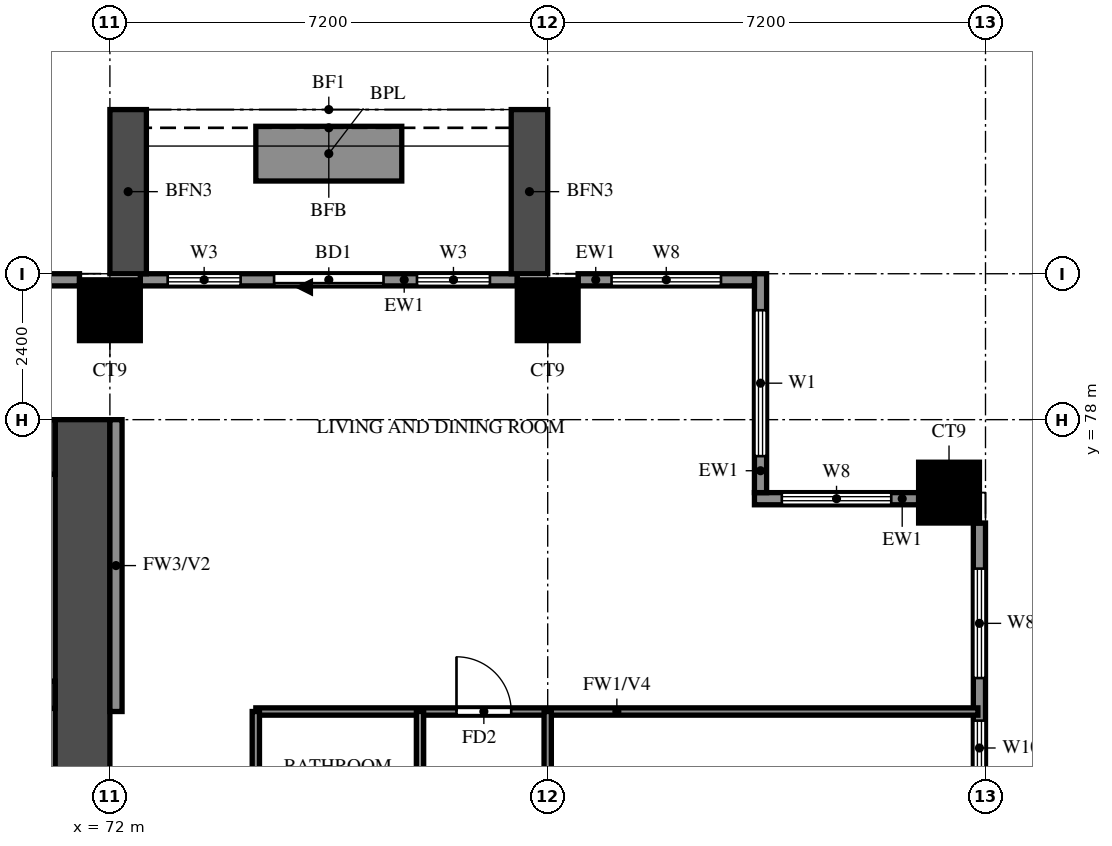
"""IFC4 building model, lengths in metres.
Left out: names, types, materials, properties, quantities, classifications, styles, units other than length and angle.
Written with IfcOpenShell. Run it as: python <this file> out.ifc"""

import sys

from ifc_helpers import new_model, si_unit, direction, frame, frame_2d, origin, origin_2d, place, context, subcontext, project, spatial, rectangle, extrude, source, transform, mapped, element, fill, save


model = new_model("IFC4")
c1 = context("Model", 3, precision=1e-05, world=origin(), true_north=direction((0.0, 1.0)))
c2 = subcontext(c1, "Body", "Model", "MODEL_VIEW")
j1 = project(units=[si_unit("LENGTHUNIT", "METRE"), si_unit("PLANEANGLEUNIT", "RADIAN")], contexts=[c1])
p1 = place(None, origin())
s1 = spatial("IfcSite", under=j1, at=p1, CompositionType="ELEMENT")
p2 = place(p1, origin())
s2 = spatial("IfcBuilding", under=s1, at=p2, CompositionType="ELEMENT")
p3 = place(p2, frame((0.0, 0.0, 72.5)))
s3 = spatial("IfcBuildingStorey", under=s2, at=p3, CompositionType="ELEMENT", Elevation=72.5)
m1 = source(origin(), c2, "Body", "SweptSolid", [
    extrude(rectangle(XDim=1.0, YDim=1.0, at=origin_2d()), origin(), (0.0, 0.0, 1.0), 3.18),
])
for number, where, z_axis, x_axis in (
    (1, (85.8, 76.8, 0.0), (0.0, 0.0, 1.0), (1.0, 0.0, 0.0)),
    (2, (72.0, 79.8, 0.0), (0.0, 0.0, 1.0), (1.0, 0.0, 0.0)),
    (3, (79.2, 79.8, 0.0), (0.0, 0.0, 1.0), (1.0, 0.0, 0.0)),
):
    element("IfcColumn", number, at=place(p3, frame(where, z_axis=z_axis, x_axis=x_axis)), inside=s3, PredefinedType="COLUMN", context=c2, shape_type="MappedRepresentation", body=[
        mapped(m1, transform((0.0, 0.0, 0.0))),
    ])
p4 = place(p3, frame((71.55, 66.0, 0.0), z_axis=(0.0, 0.0, 1.0), x_axis=(0.0, 1.0, 0.0)))
e4 = element("IfcWall", 4, at=p4, inside=s3, PredefinedType="SHEAR", context=c2, shape_type="SweptSolid", body=[
    extrude(rectangle(XDim=12.0, YDim=0.9, at=frame_2d((6.0, 0.0))), origin(), (0.0, 0.0, 1.0), 3.18),
])
p5 = place(p3, frame((29.7, 77.55, 0.0), z_axis=(0.0, 0.0, 1.0), x_axis=(1.0, 0.0, 0.0)))
e5 = element("IfcWall", 5, at=p5, inside=s3, PredefinedType="SHEAR", context=c2, shape_type="SweptSolid", body=[
    extrude(rectangle(XDim=41.4, YDim=0.9, at=frame_2d((20.7, 0.0))), origin(), (0.0, 0.0, 1.0), 3.18),
])
p6 = place(p3, frame((67.925, 73.475, 0.0), z_axis=(0.0, 0.0, 1.0), x_axis=(1.0, 0.0, 0.0)))
e6 = element("IfcWall", 6, at=p6, inside=s3, PredefinedType="SHEAR", context=c2, shape_type="SweptSolid", body=[
    extrude(rectangle(XDim=3.175, YDim=0.45, at=frame_2d((1.587, 0.0))), origin(), (0.0, 0.0, 1.0), 3.18),
])
p7 = place(p3, frame((86.3, 70.1, 0.0), z_axis=(0.0, 0.0, 1.0), x_axis=(0.0, 1.0, 0.0)))
e7 = element("IfcWall", 7, at=p7, inside=s3, PredefinedType="SOLIDWALL", context=c2, shape_type="SweptSolid", body=[
    extrude(rectangle(XDim=6.2, YDim=0.2, at=frame_2d((3.1, 0.0))), origin(), (0.0, 0.0, 1.0), 3.18),
])
p8 = place(p7, frame((2.05, 0.0, 0.6)))
e8 = element("IfcOpeningElement", 8, at=p8, cuts=e7, PredefinedType="OPENING", context=c2, shape_type="SweptSolid", body=[
    extrude(rectangle(XDim=0.9, YDim=2.4, at=frame_2d((0.45, 1.2))), frame((0.0, 0.11, 0.0), z_axis=(0.0, -1.0, 0.0), x_axis=(1.0, 0.0, 0.0)), (0.0, 0.0, 1.0), 0.22),
])
p9 = place(p7, frame((3.65, 0.0, 0.6)))
e9 = element("IfcOpeningElement", 9, at=p9, cuts=e7, PredefinedType="OPENING", context=c2, shape_type="SweptSolid", body=[
    extrude(rectangle(XDim=1.8, YDim=2.4, at=frame_2d((0.9, 1.2))), frame((0.0, 0.11, 0.0), z_axis=(0.0, -1.0, 0.0), x_axis=(1.0, 0.0, 0.0)), (0.0, 0.0, 1.0), 0.22),
])
p10 = place(p3, frame((85.3, 76.7, 0.0), z_axis=(0.0, 0.0, 1.0), x_axis=(-1.0, 0.0, 0.0)))
e10 = element("IfcWall", 10, at=p10, inside=s3, PredefinedType="SOLIDWALL", context=c2, shape_type="SweptSolid", body=[
    extrude(rectangle(XDim=2.7, YDim=0.2, at=frame_2d((1.35, 0.0))), origin(), (0.0, 0.0, 1.0), 3.18),
])
p11 = place(p10, frame((0.45, 0.0, 0.6)))
e11 = element("IfcOpeningElement", 11, at=p11, cuts=e10, PredefinedType="OPENING", context=c2, shape_type="SweptSolid", body=[
    extrude(rectangle(XDim=1.8, YDim=2.4, at=frame_2d((0.9, 1.2))), frame((0.0, 0.11, 0.0), z_axis=(0.0, -1.0, 0.0), x_axis=(1.0, 0.0, 0.0)), (0.0, 0.0, 1.0), 0.22),
])
p12 = place(p3, frame((82.7, 76.8, 0.0), z_axis=(0.0, 0.0, 1.0), x_axis=(0.0, 1.0, 0.0)))
e12 = element("IfcWall", 12, at=p12, inside=s3, PredefinedType="SOLIDWALL", context=c2, shape_type="SweptSolid", body=[
    extrude(rectangle(XDim=3.6, YDim=0.2, at=frame_2d((1.8, 0.0))), origin(), (0.0, 0.0, 1.0), 3.18),
])
p13 = place(p12, frame((0.6, 0.0, 0.6)))
e13 = element("IfcOpeningElement", 13, at=p13, cuts=e12, PredefinedType="OPENING", context=c2, shape_type="SweptSolid", body=[
    extrude(rectangle(XDim=2.4, YDim=2.4, at=frame_2d((1.2, 1.2))), frame((0.0, 0.11, 0.0), z_axis=(0.0, -1.0, 0.0), x_axis=(1.0, 0.0, 0.0)), (0.0, 0.0, 1.0), 0.22),
])
p14 = place(p3, frame((82.6, 80.3, 0.0), z_axis=(0.0, 0.0, 1.0), x_axis=(-1.0, 0.0, 0.0)))
e14 = element("IfcWall", 14, at=p14, inside=s3, PredefinedType="SOLIDWALL", context=c2, shape_type="SweptSolid", body=[
    extrude(rectangle(XDim=2.9, YDim=0.2, at=frame_2d((1.45, 0.0))), origin(), (0.0, 0.0, 1.0), 3.18),
])
p15 = place(p14, frame((0.55, 0.0, 0.6)))
e15 = element("IfcOpeningElement", 15, at=p15, cuts=e14, PredefinedType="OPENING", context=c2, shape_type="SweptSolid", body=[
    extrude(rectangle(XDim=1.8, YDim=2.4, at=frame_2d((0.9, 1.2))), frame((0.0, 0.11, 0.0), z_axis=(0.0, -1.0, 0.0), x_axis=(1.0, 0.0, 0.0)), (0.0, 0.0, 1.0), 0.22),
])
p16 = place(p3, frame((78.7, 80.3, 0.0), z_axis=(0.0, 0.0, 1.0), x_axis=(-1.0, 0.0, 0.0)))
e16 = element("IfcWall", 16, at=p16, inside=s3, PredefinedType="SOLIDWALL", context=c2, shape_type="SweptSolid", body=[
    extrude(rectangle(XDim=6.2, YDim=0.2, at=frame_2d((3.1, 0.0))), origin(), (0.0, 0.0, 1.0), 3.18),
])
p17 = place(p16, frame((2.2, 0.0, 0.0)))
e17 = element("IfcOpeningElement", 17, at=p17, cuts=e16, PredefinedType="OPENING", context=c2, shape_type="SweptSolid", body=[
    extrude(rectangle(XDim=1.8, YDim=2.4, at=frame_2d((0.9, 1.2))), frame((0.0, 0.11, 0.0), z_axis=(0.0, -1.0, 0.0), x_axis=(1.0, 0.0, 0.0)), (0.0, 0.0, 1.0), 0.22),
])
p18 = place(p16, frame((0.45, 0.0, 0.6)))
e18 = element("IfcOpeningElement", 18, at=p18, cuts=e16, PredefinedType="OPENING", context=c2, shape_type="SweptSolid", body=[
    extrude(rectangle(XDim=1.2, YDim=2.4, at=frame_2d((0.6, 1.2))), frame((0.0, 0.11, 0.0), z_axis=(0.0, -1.0, 0.0), x_axis=(1.0, 0.0, 0.0)), (0.0, 0.0, 1.0), 0.22),
])
p19 = place(p16, frame((4.55, 0.0, 0.6)))
e19 = element("IfcOpeningElement", 19, at=p19, cuts=e16, PredefinedType="OPENING", context=c2, shape_type="SweptSolid", body=[
    extrude(rectangle(XDim=1.2, YDim=2.4, at=frame_2d((0.6, 1.2))), frame((0.0, 0.11, 0.0), z_axis=(0.0, -1.0, 0.0), x_axis=(1.0, 0.0, 0.0)), (0.0, 0.0, 1.0), 0.22),
])
p20 = place(p3, frame((71.5, 80.3, 0.0), z_axis=(0.0, 0.0, 1.0), x_axis=(-1.0, 0.0, 0.0)))
e20 = element("IfcWall", 20, at=p20, inside=s3, PredefinedType="SOLIDWALL", context=c2, shape_type="SweptSolid", body=[
    extrude(rectangle(XDim=6.2, YDim=0.2, at=frame_2d((3.1, 0.0))), origin(), (0.0, 0.0, 1.0), 3.18),
])
for number, where, z_axis, x_axis in (
    (21, (78.9, 80.4, 0.0), (0.0, 0.0, 1.0), (0.0, 1.0, 0.0)),
    (22, (72.3, 80.4, 0.0), (0.0, 0.0, 1.0), (0.0, 1.0, 0.0)),
):
    element("IfcWall", number, at=place(p3, frame(where, z_axis=z_axis, x_axis=x_axis)), inside=s3, PredefinedType="SOLIDWALL", context=c2, shape_type="SweptSolid", body=[
        extrude(rectangle(XDim=2.7, YDim=0.6, at=frame_2d((1.35, 0.0))), origin(), (0.0, 0.0, 1.0), 2.85),
    ])
p21 = place(p3, frame((76.8, 82.375, 0.0), z_axis=(0.0, 0.0, 1.0), x_axis=(-1.0, 0.0, 0.0)))
e23 = element("IfcWall", 23, at=p21, inside=s3, PredefinedType="SOLIDWALL", context=c2, shape_type="SweptSolid", body=[
    extrude(rectangle(XDim=2.4, YDim=0.9, at=frame_2d((1.2, 0.0))), origin(), (0.0, 0.0, 1.0), 0.9),
])
p22 = place(p3, frame((72.1, 73.2, 0.0), z_axis=(0.0, 0.0, 1.0), x_axis=(0.0, 1.0, 0.0)))
e24 = element("IfcWall", 24, at=p22, inside=s3, PredefinedType="SOLIDWALL", context=c2, shape_type="SweptSolid", body=[
    extrude(rectangle(XDim=4.8, YDim=0.2, at=frame_2d((2.4, 0.0))), origin(), (0.0, 0.0, 1.0), 3.18),
])
p23 = place(p3, frame((74.4, 73.2, 0.0), z_axis=(0.0, 0.0, 1.0), x_axis=(1.0, 0.0, 0.0)))
e25 = element("IfcWall", 25, at=p23, inside=s3, PredefinedType="PARTITIONING", context=c2, shape_type="SweptSolid", body=[
    extrude(rectangle(XDim=11.875, YDim=0.12, at=frame_2d((5.938, 0.0))), origin(), (0.0, 0.0, 1.0), 2.28),
])
p24 = place(p23, frame((3.3, 0.0, 0.0)))
e26 = element("IfcOpeningElement", 26, at=p24, cuts=e25, PredefinedType="OPENING", context=c2, shape_type="SweptSolid", body=[
    extrude(rectangle(XDim=0.9, YDim=2.1, at=frame_2d((0.45, 1.05))), frame((0.0, 0.07, 0.0), z_axis=(0.0, -1.0, 0.0), x_axis=(1.0, 0.0, 0.0)), (0.0, 0.0, 1.0), 0.14),
])
p25 = place(p3, frame((74.4, 69.62, 0.0), z_axis=(0.0, 0.0, 1.0), x_axis=(0.0, 1.0, 0.0)))
e27 = element("IfcWall", 27, at=p25, inside=s3, PredefinedType="PARTITIONING", context=c2, shape_type="SweptSolid", body=[
    extrude(rectangle(XDim=3.58, YDim=0.12, at=frame_2d((1.79, 0.0))), origin(), (0.0, 0.0, 1.0), 3.18),
])
p26 = place(p3, frame((77.1, 64.8, 0.0), z_axis=(0.0, 0.0, 1.0), x_axis=(0.0, 1.0, 0.0)))
e28 = element("IfcWall", 28, at=p26, inside=s3, PredefinedType="PARTITIONING", context=c2, shape_type="SweptSolid", body=[
    extrude(rectangle(XDim=8.4, YDim=0.12, at=frame_2d((4.2, 0.0))), origin(), (0.0, 0.0, 1.0), 3.18),
])
p27 = place(p26, frame((1.875, 0.0, 0.0)))
e29 = element("IfcOpeningElement", 29, at=p27, cuts=e28, PredefinedType="OPENING", context=c2, shape_type="SweptSolid", body=[
    extrude(rectangle(XDim=0.9, YDim=2.1, at=frame_2d((0.45, 1.05))), frame((0.0, 0.07, 0.0), z_axis=(0.0, -1.0, 0.0), x_axis=(1.0, 0.0, 0.0)), (0.0, 0.0, 1.0), 0.14),
])
p28 = place(p26, frame((6.125, 0.0, 0.0)))
e30 = element("IfcOpeningElement", 30, at=p28, cuts=e28, PredefinedType="OPENING", context=c2, shape_type="SweptSolid", body=[
    extrude(rectangle(XDim=0.8, YDim=2.1, at=frame_2d((0.4, 1.05))), frame((0.0, 0.07, 0.0), z_axis=(0.0, -1.0, 0.0), x_axis=(1.0, 0.0, 0.0)), (0.0, 0.0, 1.0), 0.14),
])
p29 = place(p3, frame((79.2, 48.125, 0.0), z_axis=(0.0, 0.0, 1.0), x_axis=(0.0, 1.0, 0.0)))
e31 = element("IfcWall", 31, at=p29, inside=s3, PredefinedType="PARTITIONING", context=c2, shape_type="SweptSolid", body=[
    extrude(rectangle(XDim=25.075, YDim=0.12, at=frame_2d((12.538, 0.0))), origin(), (0.0, 0.0, 1.0), 3.18),
])
p30 = place(p29, frame((2.788, 0.0, 0.0)))
e32 = element("IfcOpeningElement", 32, at=p30, cuts=e31, PredefinedType="OPENING", context=c2, shape_type="SweptSolid", body=[
    extrude(rectangle(XDim=1.5, YDim=2.1, at=frame_2d((0.75, 1.05))), frame((0.0, 0.07, 0.0), z_axis=(0.0, -1.0, 0.0), x_axis=(1.0, 0.0, 0.0)), (0.0, 0.0, 1.0), 0.14),
])
p31 = place(p29, frame((8.425, 0.0, 0.0)))
e33 = element("IfcOpeningElement", 33, at=p31, cuts=e31, PredefinedType="OPENING", context=c2, shape_type="SweptSolid", body=[
    extrude(rectangle(XDim=0.9, YDim=2.1, at=frame_2d((0.45, 1.05))), frame((0.0, 0.07, 0.0), z_axis=(0.0, -1.0, 0.0), x_axis=(1.0, 0.0, 0.0)), (0.0, 0.0, 1.0), 0.14),
])
p32 = place(p29, frame((12.025, 0.0, 0.0)))
e34 = element("IfcOpeningElement", 34, at=p32, cuts=e31, PredefinedType="OPENING", context=c2, shape_type="SweptSolid", body=[
    extrude(rectangle(XDim=0.9, YDim=2.1, at=frame_2d((0.45, 1.05))), frame((0.0, 0.07, 0.0), z_axis=(0.0, -1.0, 0.0), x_axis=(1.0, 0.0, 0.0)), (0.0, 0.0, 1.0), 0.14),
])
p33 = place(p29, frame((15.625, 0.0, 0.0)))
e35 = element("IfcOpeningElement", 35, at=p33, cuts=e31, PredefinedType="OPENING", context=c2, shape_type="SweptSolid", body=[
    extrude(rectangle(XDim=0.9, YDim=2.1, at=frame_2d((0.45, 1.05))), frame((0.0, 0.07, 0.0), z_axis=(0.0, -1.0, 0.0), x_axis=(1.0, 0.0, 0.0)), (0.0, 0.0, 1.0), 0.14),
])
p34 = place(p29, frame((19.225, 0.0, 0.0)))
e36 = element("IfcOpeningElement", 36, at=p34, cuts=e31, PredefinedType="OPENING", context=c2, shape_type="SweptSolid", body=[
    extrude(rectangle(XDim=0.9, YDim=2.1, at=frame_2d((0.45, 1.05))), frame((0.0, 0.07, 0.0), z_axis=(0.0, -1.0, 0.0), x_axis=(1.0, 0.0, 0.0)), (0.0, 0.0, 1.0), 0.14),
])
p35 = place(p29, frame((22.825, 0.0, 0.0)))
e37 = element("IfcOpeningElement", 37, at=p35, cuts=e31, PredefinedType="OPENING", context=c2, shape_type="SweptSolid", body=[
    extrude(rectangle(XDim=0.9, YDim=2.1, at=frame_2d((0.45, 1.05))), frame((0.0, 0.07, 0.0), z_axis=(0.0, -1.0, 0.0), x_axis=(1.0, 0.0, 0.0)), (0.0, 0.0, 1.0), 0.14),
])
p36 = place(p8, origin())
e38 = element("IfcWindow", 38, at=p36, inside=s3, PartitioningType="SINGLE_PANEL", PredefinedType="WINDOW", context=c2, shape_type="SweptSolid", body=[
    extrude(rectangle(XDim=0.9, YDim=2.4, at=frame_2d((0.45, 1.2))), frame((0.0, 0.03, 0.0), z_axis=(0.0, -1.0, 0.0), x_axis=(1.0, 0.0, 0.0)), (0.0, 0.0, 1.0), 0.06),
])
fill(e8, e38)
p37 = place(p9, origin())
e39 = element("IfcWindow", 39, at=p37, inside=s3, PartitioningType="DOUBLE_PANEL_VERTICAL", PredefinedType="WINDOW", context=c2, shape_type="SweptSolid", body=[
    extrude(rectangle(XDim=1.8, YDim=2.4, at=frame_2d((0.9, 1.2))), frame((0.0, 0.03, 0.0), z_axis=(0.0, -1.0, 0.0), x_axis=(1.0, 0.0, 0.0)), (0.0, 0.0, 1.0), 0.06),
])
fill(e9, e39)
p38 = place(p11, origin())
e40 = element("IfcWindow", 40, at=p38, inside=s3, PartitioningType="DOUBLE_PANEL_VERTICAL", PredefinedType="WINDOW", context=c2, shape_type="SweptSolid", body=[
    extrude(rectangle(XDim=1.8, YDim=2.4, at=frame_2d((0.9, 1.2))), frame((0.0, 0.03, 0.0), z_axis=(0.0, -1.0, 0.0), x_axis=(1.0, 0.0, 0.0)), (0.0, 0.0, 1.0), 0.06),
])
fill(e11, e40)
p39 = place(p13, origin())
e41 = element("IfcWindow", 41, at=p39, inside=s3, PartitioningType="DOUBLE_PANEL_VERTICAL", PredefinedType="WINDOW", context=c2, shape_type="SweptSolid", body=[
    extrude(rectangle(XDim=2.4, YDim=2.4, at=frame_2d((1.2, 1.2))), frame((0.0, 0.03, 0.0), z_axis=(0.0, -1.0, 0.0), x_axis=(1.0, 0.0, 0.0)), (0.0, 0.0, 1.0), 0.06),
])
fill(e13, e41)
p40 = place(p15, origin())
e42 = element("IfcWindow", 42, at=p40, inside=s3, PartitioningType="DOUBLE_PANEL_VERTICAL", PredefinedType="WINDOW", context=c2, shape_type="SweptSolid", body=[
    extrude(rectangle(XDim=1.8, YDim=2.4, at=frame_2d((0.9, 1.2))), frame((0.0, 0.03, 0.0), z_axis=(0.0, -1.0, 0.0), x_axis=(1.0, 0.0, 0.0)), (0.0, 0.0, 1.0), 0.06),
])
fill(e15, e42)
p41 = place(p17, origin())
e43 = element("IfcDoor", 43, at=p41, inside=s3, OperationType="DOUBLE_DOOR_SLIDING", PredefinedType="DOOR", context=c2, shape_type="SweptSolid", body=[
    extrude(rectangle(XDim=1.8, YDim=2.4, at=frame_2d((0.9, 1.2))), frame((0.0, 0.025, 0.0), z_axis=(0.0, -1.0, 0.0), x_axis=(1.0, 0.0, 0.0)), (0.0, 0.0, 1.0), 0.05),
])
fill(e17, e43)
p42 = place(p18, origin())
e44 = element("IfcWindow", 44, at=p42, inside=s3, PartitioningType="SINGLE_PANEL", PredefinedType="WINDOW", context=c2, shape_type="SweptSolid", body=[
    extrude(rectangle(XDim=1.2, YDim=2.4, at=frame_2d((0.6, 1.2))), frame((0.0, 0.03, 0.0), z_axis=(0.0, -1.0, 0.0), x_axis=(1.0, 0.0, 0.0)), (0.0, 0.0, 1.0), 0.06),
])
fill(e18, e44)
p43 = place(p19, origin())
e45 = element("IfcWindow", 45, at=p43, inside=s3, PartitioningType="SINGLE_PANEL", PredefinedType="WINDOW", context=c2, shape_type="SweptSolid", body=[
    extrude(rectangle(XDim=1.2, YDim=2.4, at=frame_2d((0.6, 1.2))), frame((0.0, 0.03, 0.0), z_axis=(0.0, -1.0, 0.0), x_axis=(1.0, 0.0, 0.0)), (0.0, 0.0, 1.0), 0.06),
])
fill(e19, e45)
p44 = place(p24, origin())
e46 = element("IfcDoor", 46, at=p44, inside=s3, OperationType="SINGLE_SWING_RIGHT", PredefinedType="DOOR", context=c2, shape_type="SweptSolid", body=[
    extrude(rectangle(XDim=0.9, YDim=2.1, at=frame_2d((0.45, 1.05))), frame((0.0, 0.025, 0.0), z_axis=(0.0, -1.0, 0.0), x_axis=(1.0, 0.0, 0.0)), (0.0, 0.0, 1.0), 0.05),
])
fill(e26, e46)
save(model, sys.argv[1])
